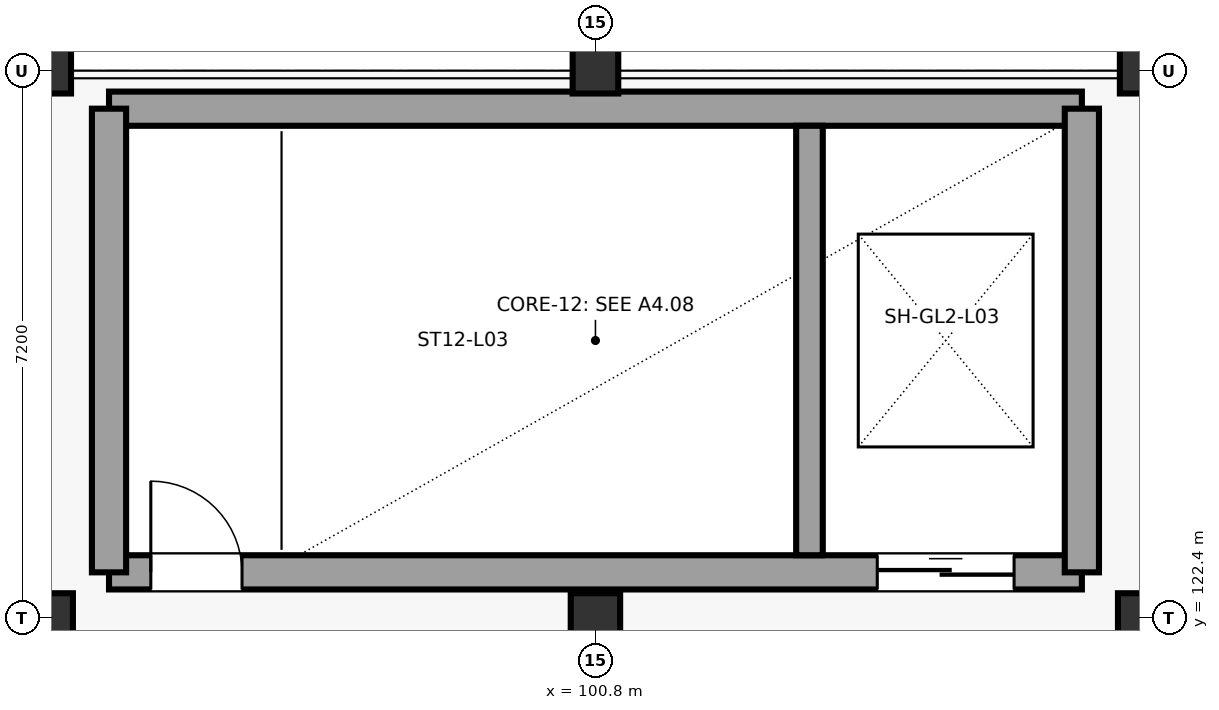
"""IFC4 building model, lengths in metres.
Left out: names, types, materials, properties, quantities, classifications, styles, units other than length and angle.
Written with IfcOpenShell. Run it as: python <this file> out.ifc"""

import sys

from ifc_helpers import new_model, si_unit, direction, frame, frame_2d, origin, origin_2d, place, context, subcontext, project, spatial, rectangle, extrude, element, fill, save


model = new_model("IFC4")
c1 = context("Model", 3, precision=1e-05, world=origin(), true_north=direction((0.0, 1.0)))
c2 = subcontext(c1, "Body", "Model", "MODEL_VIEW")
j1 = project(units=[si_unit("LENGTHUNIT", "METRE"), si_unit("PLANEANGLEUNIT", "RADIAN")], contexts=[c1])
p1 = place(None, origin())
s1 = spatial("IfcSite", under=j1, at=p1, CompositionType="ELEMENT")
p2 = place(p1, origin())
s2 = spatial("IfcBuilding", under=s1, at=p2, CompositionType="ELEMENT")
p3 = place(p2, frame((0.0, 0.0, 13.8)))
s3 = spatial("IfcBuildingStorey", under=s2, at=p3, CompositionType="ELEMENT", Elevation=13.8)
p4 = place(p3, frame((93.6, 122.4, 0.0), z_axis=(0.0, 0.0, 1.0), x_axis=(1.0, 0.0, 0.0)))
e1 = element("IfcColumn", 1, at=p4, inside=s3, PredefinedType="COLUMN", context=c2, shape_type="SweptSolid", body=[
    extrude(rectangle(XDim=0.65, YDim=0.65, at=origin_2d()), origin(), (0.0, 0.0, 1.0), 4.8),
])
p5 = place(p3, frame((93.6, 129.6, 0.0), z_axis=(0.0, 0.0, 1.0), x_axis=(1.0, 0.0, 0.0)))
e2 = element("IfcColumn", 2, at=p5, inside=s3, PredefinedType="COLUMN", context=c2, shape_type="SweptSolid", body=[
    extrude(rectangle(XDim=0.6, YDim=0.6, at=origin_2d()), origin(), (0.0, 0.0, 1.0), 4.8),
])
p6 = place(p3, frame((100.8, 122.4, 0.0), z_axis=(0.0, 0.0, 1.0), x_axis=(1.0, 0.0, 0.0)))
e3 = element("IfcColumn", 3, at=p6, inside=s3, PredefinedType="COLUMN", context=c2, shape_type="SweptSolid", body=[
    extrude(rectangle(XDim=0.65, YDim=0.65, at=origin_2d()), origin(), (0.0, 0.0, 1.0), 4.8),
])
p7 = place(p3, frame((100.8, 129.6, 0.0), z_axis=(0.0, 0.0, 1.0), x_axis=(1.0, 0.0, 0.0)))
e4 = element("IfcColumn", 4, at=p7, inside=s3, PredefinedType="COLUMN", context=c2, shape_type="SweptSolid", body=[
    extrude(rectangle(XDim=0.6, YDim=0.6, at=origin_2d()), origin(), (0.0, 0.0, 1.0), 4.8),
])
p8 = place(p3, frame((108.0, 122.4, 0.0), z_axis=(0.0, 0.0, 1.0), x_axis=(1.0, 0.0, 0.0)))
e5 = element("IfcColumn", 5, at=p8, inside=s3, PredefinedType="COLUMN", context=c2, shape_type="SweptSolid", body=[
    extrude(rectangle(XDim=0.65, YDim=0.65, at=origin_2d()), origin(), (0.0, 0.0, 1.0), 4.8),
])
p9 = place(p3, frame((108.0, 129.6, 0.0), z_axis=(0.0, 0.0, 1.0), x_axis=(1.0, 0.0, 0.0)))
e6 = element("IfcColumn", 6, at=p9, inside=s3, PredefinedType="COLUMN", context=c2, shape_type="SweptSolid", body=[
    extrude(rectangle(XDim=0.6, YDim=0.6, at=origin_2d()), origin(), (0.0, 0.0, 1.0), 4.8),
])
p10 = place(p3, frame((94.4, 123.0, 0.0), z_axis=(0.0, 0.0, 1.0), x_axis=(1.0, 0.0, 0.0)))
e7 = element("IfcWall", 7, at=p10, inside=s3, PredefinedType="SHEAR", context=c2, shape_type="SweptSolid", body=[
    extrude(rectangle(XDim=12.8, YDim=0.45, at=frame_2d((6.4, 0.0))), origin(), (0.0, 0.0, 1.0), 4.53),
])
p11 = place(p10, frame((0.55, 0.0, 0.0)))
e8 = element("IfcOpeningElement", 8, at=p11, cuts=e7, PredefinedType="OPENING", context=c2, shape_type="SweptSolid", body=[
    extrude(rectangle(XDim=1.2, YDim=2.25, at=frame_2d((0.6, 1.125))), frame((0.0, 0.235, 0.0), z_axis=(0.0, -1.0, 0.0), x_axis=(1.0, 0.0, 0.0)), (0.0, 0.0, 1.0), 0.47),
])
p12 = place(p10, frame((10.108, 0.0, 0.0)))
e9 = element("IfcOpeningElement", 9, at=p12, cuts=e7, PredefinedType="OPENING", context=c2, shape_type="SweptSolid", body=[
    extrude(rectangle(XDim=1.8, YDim=2.4, at=frame_2d((0.9, 1.2))), frame((0.0, 0.235, 0.0), z_axis=(0.0, -1.0, 0.0), x_axis=(1.0, 0.0, 0.0)), (0.0, 0.0, 1.0), 0.47),
])
p13 = place(p3, frame((94.4, 129.1, 0.0), z_axis=(0.0, 0.0, 1.0), x_axis=(1.0, 0.0, 0.0)))
e10 = element("IfcWall", 10, at=p13, inside=s3, PredefinedType="SHEAR", context=c2, shape_type="SweptSolid", body=[
    extrude(rectangle(XDim=12.8, YDim=0.45, at=frame_2d((6.4, 0.0))), origin(), (0.0, 0.0, 1.0), 4.53),
])
for number, where, z_axis, x_axis in (
    (11, (94.4, 123.0, 0.0), (0.0, 0.0, 1.0), (0.0, 1.0, 0.0)),
    (12, (107.2, 123.0, 0.0), (0.0, 0.0, 1.0), (0.0, 1.0, 0.0)),
):
    element("IfcWall", number, at=place(p3, frame(where, z_axis=z_axis, x_axis=x_axis)), inside=s3, PredefinedType="SHEAR", context=c2, shape_type="SweptSolid", body=[
        extrude(rectangle(XDim=6.1, YDim=0.45, at=frame_2d((3.05, 0.0))), origin(), (0.0, 0.0, 1.0), 4.53),
    ])
p14 = place(p3, frame((103.616, 123.225, 0.0), z_axis=(0.0, 0.0, 1.0), x_axis=(0.0, 1.0, 0.0)))
e13 = element("IfcWall", 13, at=p14, inside=s3, PredefinedType="SHEAR", context=c2, shape_type="SweptSolid", body=[
    extrude(rectangle(XDim=5.65, YDim=0.35, at=frame_2d((2.825, 0.0))), origin(), (0.0, 0.0, 1.0), 4.53),
])
p15 = place(p11, origin())
e14 = element("IfcDoor", 14, at=p15, inside=s3, OperationType="SINGLE_SWING_LEFT", PredefinedType="DOOR", context=c2, shape_type="SweptSolid", body=[
    extrude(rectangle(XDim=1.2, YDim=2.25, at=frame_2d((0.6, 1.125))), frame((0.0, 0.025, 0.0), z_axis=(0.0, -1.0, 0.0), x_axis=(1.0, 0.0, 0.0)), (0.0, 0.0, 1.0), 0.05),
])
fill(e8, e14)
p16 = place(p12, origin())
e15 = element("IfcDoor", 15, at=p16, inside=s3, OperationType="SLIDING_TO_RIGHT", PredefinedType="DOOR", context=c2, shape_type="SweptSolid", body=[
    extrude(rectangle(XDim=1.8, YDim=2.4, at=frame_2d((0.9, 1.2))), frame((0.0, 0.025, 0.0), z_axis=(0.0, -1.0, 0.0), x_axis=(1.0, 0.0, 0.0)), (0.0, 0.0, 1.0), 0.05),
])
fill(e9, e15)
save(model, sys.argv[1])
